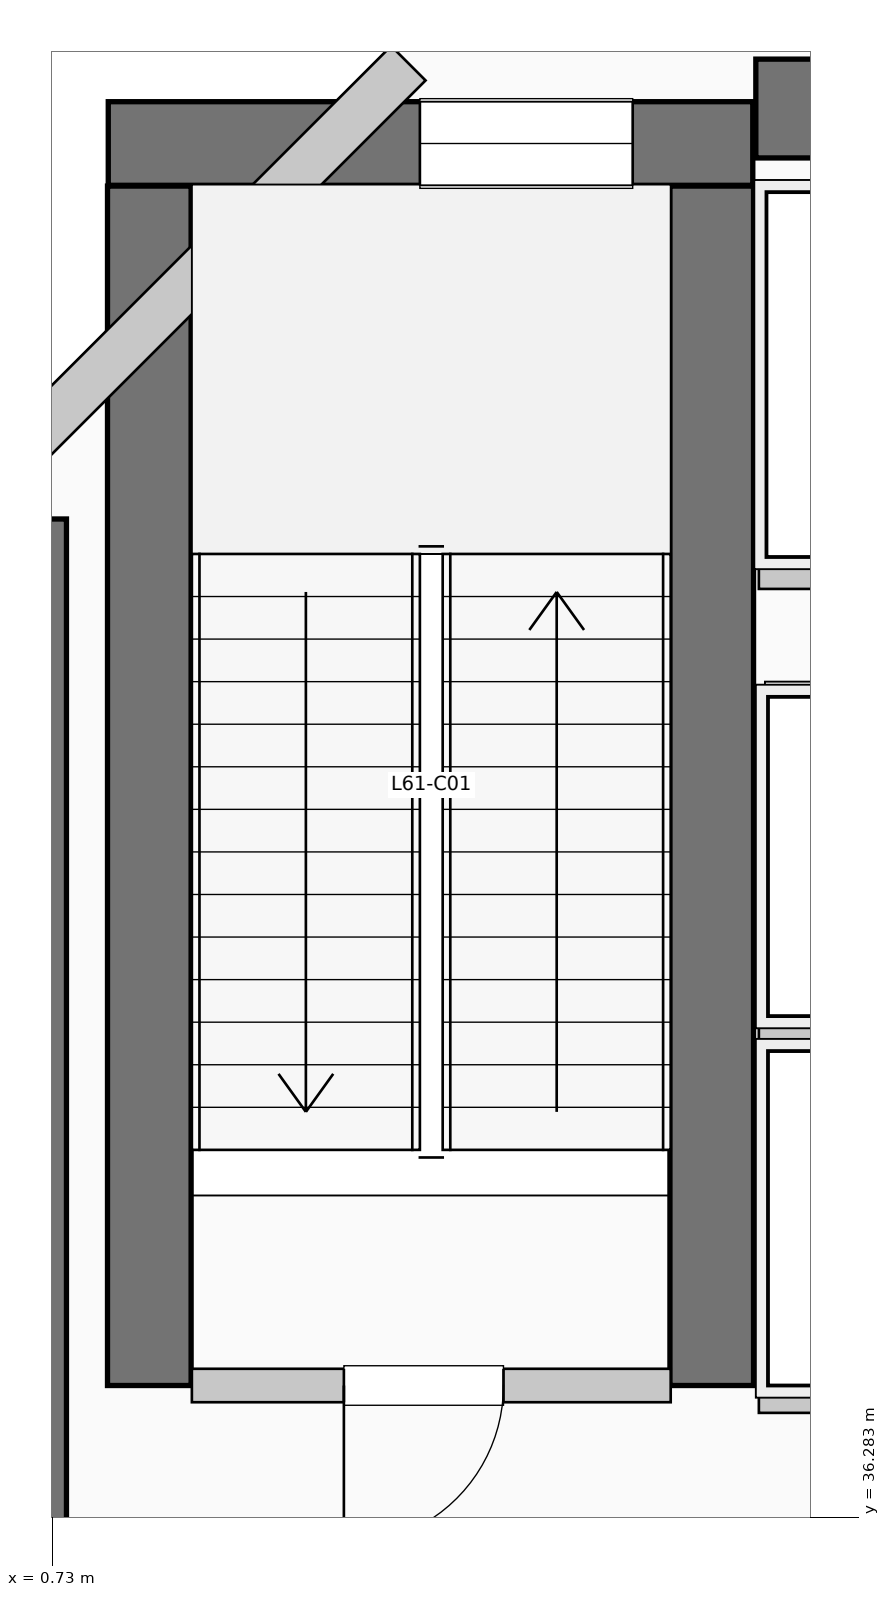
"""IFC4 building model, lengths in metres.
Left out: names, types, materials, properties, quantities, classifications, styles, units other than length and angle.
Written with IfcOpenShell. Run it as: python <this file> out.ifc"""

import sys

from ifc_helpers import new_model, si_unit, direction, frame, frame_2d, origin, place, context, subcontext, project, spatial, rectangle, extrude, element, fill, save


model = new_model("IFC4")
c1 = context("Model", 3, precision=1e-05, world=origin(), true_north=direction((0.0, 1.0)))
c2 = subcontext(c1, "Body", "Model", "MODEL_VIEW")
j1 = project(units=[si_unit("LENGTHUNIT", "METRE"), si_unit("PLANEANGLEUNIT", "RADIAN")], contexts=[c1])
p1 = place(None, origin())
s1 = spatial("IfcSite", under=j1, at=p1, CompositionType="ELEMENT")
p2 = place(p1, origin())
s2 = spatial("IfcBuilding", under=s1, at=p2, CompositionType="ELEMENT")
p3 = place(p2, frame((0.0, 0.0, 251.46)))
s3 = spatial("IfcBuildingStorey", under=s2, at=p3, CompositionType="ELEMENT", Elevation=251.46)
p4 = place(p3, frame((5.36, 45.55, 0.0), z_axis=(0.0, 0.0, 1.0), x_axis=(1.0, 0.0, 0.0)))
e1 = element("IfcWall", 1, at=p4, inside=s3, PredefinedType="SHEAR", context=c2, shape_type="SweptSolid", body=[
    extrude(rectangle(XDim=13.98, YDim=0.65, at=frame_2d((6.99, 0.0))), origin(), (0.0, 0.0, 1.0), 4.95),
])
p5 = place(p3, frame((0.5, 34.95, 0.0), z_axis=(0.0, 0.0, 1.0), x_axis=(0.0, 1.0, 0.0)))
e2 = element("IfcWall", 2, at=p5, inside=s3, PredefinedType="SHEAR", context=c2, shape_type="SweptSolid", body=[
    extrude(rectangle(XDim=7.9, YDim=0.65, at=frame_2d((3.95, 0.0))), origin(), (0.0, 0.0, 1.0), 4.95),
])
for number, where, z_axis, x_axis in (
    (3, (1.37, 37.15, 0.0), (0.0, 0.0, 1.0), (0.0, 1.0, 0.0)),
    (4, (5.07, 37.15, 0.0), (0.0, 0.0, 1.0), (0.0, 1.0, 0.0)),
):
    element("IfcWall", number, at=place(p3, frame(where, z_axis=z_axis, x_axis=x_axis)), inside=s3, PredefinedType="SHEAR", context=c2, shape_type="SweptSolid", body=[
        extrude(rectangle(XDim=7.89, YDim=0.55, at=frame_2d((3.945, 0.0))), origin(), (0.0, 0.0, 1.0), 4.95),
    ])
p6 = place(p3, frame((1.1, 45.32, 0.0), z_axis=(0.0, 0.0, 1.0), x_axis=(1.0, 0.0, 0.0)))
e5 = element("IfcWall", 5, at=p6, inside=s3, PredefinedType="SHEAR", context=c2, shape_type="SweptSolid", body=[
    extrude(rectangle(XDim=4.24, YDim=0.55, at=frame_2d((2.12, 0.0))), origin(), (0.0, 0.0, 1.0), 4.95),
])
p7 = place(p6, frame((2.05, 0.0, 1.05)))
e6 = element("IfcOpeningElement", 6, at=p7, cuts=e5, PredefinedType="OPENING", context=c2, shape_type="SweptSolid", body=[
    extrude(rectangle(XDim=1.4, YDim=1.8, at=frame_2d((0.7, 0.9))), frame((0.0, 0.285, 0.0), z_axis=(0.0, -1.0, 0.0), x_axis=(1.0, 0.0, 0.0)), (0.0, 0.0, 1.0), 0.57),
])
p8 = place(p3, frame((3.074, 45.848, 0.0), z_axis=(0.0, 0.0, 1.0), x_axis=(-0.707106781187, -0.707106781187, 0.0)))
e7 = element("IfcWall", 7, at=p8, inside=s3, PredefinedType="SOLIDWALL", context=c2, shape_type="SweptSolid", body=[
    extrude(rectangle(XDim=4.133, YDim=0.32, at=frame_2d((2.066, 0.0))), origin(), (0.0, 0.0, 1.0), 4.7),
])
p9 = place(p3, frame((1.65, 37.15, 0.0), z_axis=(0.0, 0.0, 1.0), x_axis=(1.0, 0.0, 0.0)))
e8 = element("IfcWall", 8, at=p9, inside=s3, PredefinedType="PARTITIONING", context=c2, shape_type="SweptSolid", body=[
    extrude(rectangle(XDim=3.15, YDim=0.22, at=frame_2d((1.575, 0.0))), origin(), (0.0, 0.0, 1.0), 4.7),
])
p10 = place(p9, frame((2.05, 0.0, 0.0), z_axis=(0.0, 0.0, 1.0), x_axis=(-1.0, 0.0, 0.0)))
e9 = element("IfcOpeningElement", 9, at=p10, cuts=e8, PredefinedType="OPENING", context=c2, shape_type="SweptSolid", body=[
    extrude(rectangle(XDim=1.05, YDim=2.15, at=frame_2d((0.525, 1.075))), frame((0.0, 0.12, 0.0), z_axis=(0.0, -1.0, 0.0), x_axis=(1.0, 0.0, 0.0)), (0.0, 0.0, 1.0), 0.24),
])
p11 = place(p3, frame((5.38, 37.08, 0.0), z_axis=(0.0, 0.0, 1.0), x_axis=(1.0, 0.0, 0.0)))
e10 = element("IfcWall", 10, at=p11, inside=s3, PredefinedType="PARTITIONING", context=c2, shape_type="SweptSolid", body=[
    extrude(rectangle(XDim=3.46, YDim=0.22, at=frame_2d((1.73, 0.0))), origin(), (0.0, 0.0, 1.0), 4.7),
])
p12 = place(p11, frame((1.55, 0.0, 0.0), z_axis=(0.0, 0.0, 1.0), x_axis=(-1.0, 0.0, 0.0)))
e11 = element("IfcOpeningElement", 11, at=p12, cuts=e10, PredefinedType="OPENING", context=c2, shape_type="SweptSolid", body=[
    extrude(rectangle(XDim=1.2, YDim=2.2, at=frame_2d((0.6, 1.1))), frame((0.0, 0.12, 0.0), z_axis=(0.0, -1.0, 0.0), x_axis=(1.0, 0.0, 0.0)), (0.0, 0.0, 1.0), 0.24),
])
p13 = place(p11, frame((3.22, 0.0, 0.0), z_axis=(0.0, 0.0, 1.0), x_axis=(-1.0, 0.0, 0.0)))
e12 = element("IfcOpeningElement", 12, at=p13, cuts=e10, PredefinedType="OPENING", context=c2, shape_type="SweptSolid", body=[
    extrude(rectangle(XDim=1.2, YDim=2.2, at=frame_2d((0.6, 1.1))), frame((0.0, 0.12, 0.0), z_axis=(0.0, -1.0, 0.0), x_axis=(1.0, 0.0, 0.0)), (0.0, 0.0, 1.0), 0.24),
])
p14 = place(p3, frame((5.38, 39.45, 0.0), z_axis=(0.0, 0.0, 1.0), x_axis=(1.0, 0.0, 0.0)))
e13 = element("IfcWall", 13, at=p14, inside=s3, PredefinedType="PARTITIONING", context=c2, shape_type="SweptSolid", body=[
    extrude(rectangle(XDim=3.46, YDim=0.22, at=frame_2d((1.73, 0.0))), origin(), (0.0, 0.0, 1.0), 4.7),
])
p15 = place(p3, frame((5.38, 42.5, 0.0), z_axis=(0.0, 0.0, 1.0), x_axis=(1.0, 0.0, 0.0)))
e14 = element("IfcWall", 14, at=p15, inside=s3, PredefinedType="PARTITIONING", context=c2, shape_type="SweptSolid", body=[
    extrude(rectangle(XDim=3.77, YDim=0.22, at=frame_2d((1.885, 0.0))), origin(), (0.0, 0.0, 1.0), 4.7),
])
p16 = place(p15, frame((1.75, 0.0, 0.0), z_axis=(0.0, 0.0, 1.0), x_axis=(-1.0, 0.0, 0.0)))
e15 = element("IfcOpeningElement", 15, at=p16, cuts=e14, PredefinedType="OPENING", context=c2, shape_type="SweptSolid", body=[
    extrude(rectangle(XDim=1.4, YDim=2.2, at=frame_2d((0.7, 1.1))), frame((0.0, 0.12, 0.0), z_axis=(0.0, -1.0, 0.0), x_axis=(1.0, 0.0, 0.0)), (0.0, 0.0, 1.0), 0.24),
])
p17 = place(p15, frame((3.53, 0.0, 0.0), z_axis=(0.0, 0.0, 1.0), x_axis=(-1.0, 0.0, 0.0)))
e16 = element("IfcOpeningElement", 16, at=p17, cuts=e14, PredefinedType="OPENING", context=c2, shape_type="SweptSolid", body=[
    extrude(rectangle(XDim=1.4, YDim=2.2, at=frame_2d((0.7, 1.1))), frame((0.0, 0.12, 0.0), z_axis=(0.0, -1.0, 0.0), x_axis=(1.0, 0.0, 0.0)), (0.0, 0.0, 1.0), 0.24),
])
p18 = place(p7, origin())
e17 = element("IfcWindow", 17, at=p18, inside=s3, PartitioningType="SINGLE_PANEL", PredefinedType="WINDOW", context=c2, shape_type="SweptSolid", body=[
    extrude(rectangle(XDim=1.4, YDim=1.8, at=frame_2d((0.7, 0.9))), frame((0.0, 0.03, 0.0), z_axis=(0.0, -1.0, 0.0), x_axis=(1.0, 0.0, 0.0)), (0.0, 0.0, 1.0), 0.06),
])
fill(e6, e17)
p19 = place(p10, origin())
e18 = element("IfcDoor", 18, at=p19, inside=s3, OperationType="SINGLE_SWING_LEFT", PredefinedType="DOOR", context=c2, shape_type="SweptSolid", body=[
    extrude(rectangle(XDim=1.05, YDim=2.15, at=frame_2d((0.525, 1.075))), frame((0.0, 0.025, 0.0), z_axis=(0.0, -1.0, 0.0), x_axis=(1.0, 0.0, 0.0)), (0.0, 0.0, 1.0), 0.05),
])
fill(e9, e18)
save(model, sys.argv[1])
